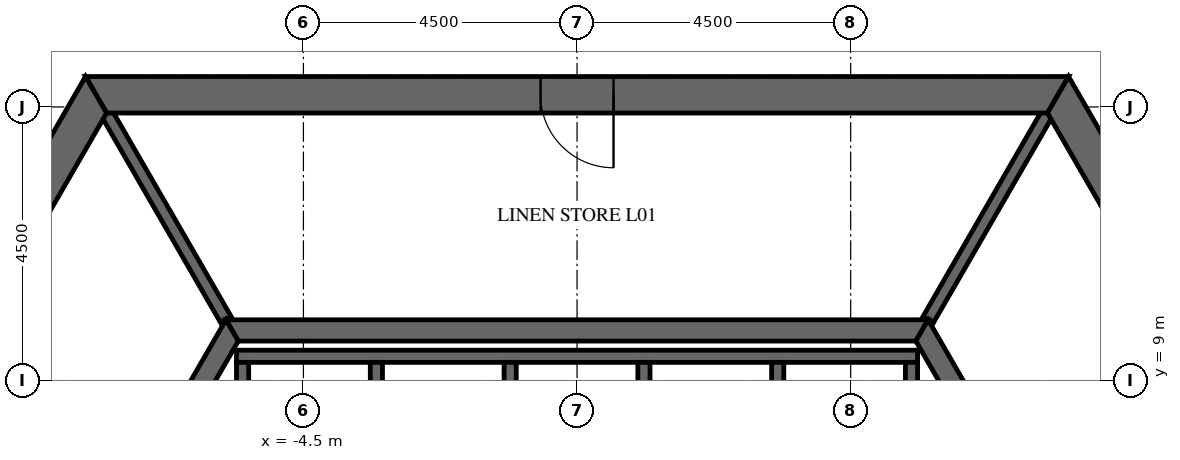
"""IFC4 building model, lengths in metres.
Left out: names, types, materials, properties, quantities, classifications, styles, units other than length and angle.
Written with IfcOpenShell. Run it as: python <this file> out.ifc"""

import sys

from ifc_helpers import new_model, si_unit, direction, frame, frame_2d, origin, place, context, subcontext, project, spatial, polyline, rectangle, outline, extrude, element, fill, save


model = new_model("IFC4")
c1 = context("Model", 3, precision=1e-05, world=origin(), true_north=direction((0.0, 1.0)))
c2 = subcontext(c1, "Body", "Model", "MODEL_VIEW")
j1 = project(units=[si_unit("LENGTHUNIT", "METRE"), si_unit("PLANEANGLEUNIT", "RADIAN")], contexts=[c1])
p1 = place(None, origin())
s1 = spatial("IfcSite", under=j1, at=p1, CompositionType="ELEMENT")
p2 = place(p1, origin())
s2 = spatial("IfcBuilding", under=s1, at=p2, CompositionType="ELEMENT")
p3 = place(p2, frame((0.0, 0.0, 9.0)))
s3 = spatial("IfcBuildingStorey", under=s2, at=p3, CompositionType="ELEMENT", Elevation=9.0)
p4 = place(p3, frame((-7.91, 13.7, -0.25), z_axis=(0.0, 0.0, 1.0), x_axis=(-0.499999880136, -0.866025472988, 0.0)))
e1 = element("IfcWall", 1, at=p4, inside=s3, PredefinedType="SHEAR", context=c2, shape_type="SweptSolid", body=[
    extrude(outline(polyline([(-0.173, -0.3), (15.993, -0.3), (15.646, 0.3), (0.173, 0.3), (-0.173, -0.3)])), origin(), (0.0, 0.0, 1.0), 6.0),
])
p5 = place(p4, frame((7.039, 0.0, 0.25)))
e2 = element("IfcOpeningElement", 2, at=p5, cuts=e1, PredefinedType="OPENING", context=c2, shape_type="SweptSolid", body=[
    extrude(rectangle(XDim=1.8, YDim=2.4, at=frame_2d((0.9, 1.2))), frame((0.0, 0.31, 0.0), z_axis=(0.0, -1.0, 0.0), x_axis=(1.0, 0.0, 0.0)), (0.0, 0.0, 1.0), 0.62),
])
p6 = place(p3, frame((15.819, 0.0, -0.25), z_axis=(0.0, 0.0, 1.0), x_axis=(-0.499999880136, 0.866025472988, 0.0)))
e3 = element("IfcWall", 3, at=p6, inside=s3, PredefinedType="SHEAR", context=c2, shape_type="SweptSolid", body=[
    extrude(outline(polyline([(-0.173, -0.3), (15.993, -0.3), (15.646, 0.3), (0.173, 0.3), (-0.173, -0.3)])), origin(), (0.0, 0.0, 1.0), 6.0),
])
p7 = place(p6, frame((6.981, 0.0, 0.25)))
e4 = element("IfcOpeningElement", 4, at=p7, cuts=e3, PredefinedType="OPENING", context=c2, shape_type="SweptSolid", body=[
    extrude(rectangle(XDim=1.8, YDim=2.4, at=frame_2d((0.9, 1.2))), frame((0.0, 0.31, 0.0), z_axis=(0.0, -1.0, 0.0), x_axis=(1.0, 0.0, 0.0)), (0.0, 0.0, 1.0), 0.62),
])
p8 = place(p3, frame((7.91, 13.7, -0.25), z_axis=(0.0, 0.0, 1.0), x_axis=(-1.0, 0.0, 0.0)))
e5 = element("IfcWall", 5, at=p8, inside=s3, PredefinedType="SHEAR", context=c2, shape_type="SweptSolid", body=[
    extrude(outline(polyline([(-0.173, -0.3), (15.993, -0.3), (15.646, 0.3), (0.173, 0.3), (-0.173, -0.3)])), origin(), (0.0, 0.0, 1.0), 6.0),
])
p9 = place(p8, frame((7.31, 0.0, 0.25)))
e6 = element("IfcOpeningElement", 6, at=p9, cuts=e5, PredefinedType="OPENING", context=c2, shape_type="SweptSolid", body=[
    extrude(rectangle(XDim=1.2, YDim=2.4, at=frame_2d((0.6, 1.2))), frame((0.0, 0.31, 0.0), z_axis=(0.0, -1.0, 0.0), x_axis=(1.0, 0.0, 0.0)), (0.0, 0.0, 1.0), 0.62),
])
p10 = place(p3, frame((-5.673, 9.825, -0.25), z_axis=(0.0, 0.0, 1.0), x_axis=(-0.499995046907, -0.866028263435, 0.0)))
e7 = element("IfcWall", 7, at=p10, inside=s3, PredefinedType="SHEAR", context=c2, shape_type="SweptSolid", body=[
    extrude(outline(polyline([(-0.101, -0.175), (11.446, -0.175), (11.244, 0.175), (0.101, 0.175), (-0.101, -0.175)])), origin(), (0.0, 0.0, 1.0), 6.0),
])
p11 = place(p10, frame((4.801, 0.0, 0.25)))
e8 = element("IfcOpeningElement", 8, at=p11, cuts=e7, PredefinedType="OPENING", context=c2, shape_type="SweptSolid", body=[
    extrude(rectangle(XDim=1.8, YDim=2.4, at=frame_2d((0.9, 1.2))), frame((0.0, 0.185, 0.0), z_axis=(0.0, -1.0, 0.0), x_axis=(1.0, 0.0, 0.0)), (0.0, 0.0, 1.0), 0.37),
])
p12 = place(p3, frame((11.345, 0.0, -0.25), z_axis=(0.0, 0.0, 1.0), x_axis=(-0.499995046907, 0.866028263435, 0.0)))
e9 = element("IfcWall", 9, at=p12, inside=s3, PredefinedType="SHEAR", context=c2, shape_type="SweptSolid", body=[
    extrude(outline(polyline([(-0.101, -0.175), (11.446, -0.175), (11.244, 0.175), (0.101, 0.175), (-0.101, -0.175)])), origin(), (0.0, 0.0, 1.0), 6.0),
])
p13 = place(p12, frame((4.744, 0.0, 0.25)))
e10 = element("IfcOpeningElement", 10, at=p13, cuts=e9, PredefinedType="OPENING", context=c2, shape_type="SweptSolid", body=[
    extrude(rectangle(XDim=1.8, YDim=2.4, at=frame_2d((0.9, 1.2))), frame((0.0, 0.185, 0.0), z_axis=(0.0, -1.0, 0.0), x_axis=(1.0, 0.0, 0.0)), (0.0, 0.0, 1.0), 0.37),
])
p14 = place(p3, frame((5.673, 9.825, -0.25), z_axis=(0.0, 0.0, 1.0), x_axis=(-1.0, 0.0, 0.0)))
e11 = element("IfcWall", 11, at=p14, inside=s3, PredefinedType="SHEAR", context=c2, shape_type="SweptSolid", body=[
    extrude(outline(polyline([(-0.101, -0.175), (11.446, -0.175), (11.244, 0.175), (0.101, 0.175), (-0.101, -0.175)])), origin(), (0.0, 0.0, 1.0), 6.0),
])
p15 = place(p3, frame((-5.6, 9.4, -0.25), z_axis=(0.0, 0.0, 1.0), x_axis=(1.0, 0.0, 0.0)))
e12 = element("IfcWall", 12, at=p15, inside=s3, PredefinedType="SHEAR", context=c2, shape_type="SweptSolid", body=[
    extrude(rectangle(XDim=11.2, YDim=0.2, at=frame_2d((5.6, 0.0))), origin(), (0.0, 0.0, 1.0), 6.0),
])
for number, where, z_axis, x_axis in (
    (13, (-5.5, 6.4, -0.25), (0.0, 0.0, 1.0), (0.0, 1.0, 0.0)),
    (14, (-3.3, 6.4, -0.25), (0.0, 0.0, 1.0), (0.0, 1.0, 0.0)),
    (15, (-1.1, 6.4, -0.25), (0.0, 0.0, 1.0), (0.0, 1.0, 0.0)),
    (16, (1.1, 6.4, -0.25), (0.0, 0.0, 1.0), (0.0, 1.0, 0.0)),
    (17, (3.3, 6.4, -0.25), (0.0, 0.0, 1.0), (0.0, 1.0, 0.0)),
    (18, (5.5, 6.4, -0.25), (0.0, 0.0, 1.0), (0.0, 1.0, 0.0)),
):
    element("IfcWall", number, at=place(p3, frame(where, z_axis=z_axis, x_axis=x_axis)), inside=s3, PredefinedType="SHEAR", context=c2, shape_type="SweptSolid", body=[
        extrude(rectangle(XDim=2.9, YDim=0.2, at=frame_2d((1.45, 0.0))), origin(), (0.0, 0.0, 1.0), 6.0),
    ])
for number, where, z_axis, x_axis in (
    (19, (5.773, 10.0, -0.25), (0.0, 0.0, 1.0), (0.5, 0.866, 0.0)),
    (20, (-5.773, 10.0, -0.25), (0.0, 0.0, 1.0), (-0.5, 0.866, 0.0)),
):
    element("IfcWall", number, at=place(p3, frame(where, z_axis=z_axis, x_axis=x_axis)), inside=s3, PredefinedType="SHEAR", context=c2, shape_type="SweptSolid", body=[
        extrude(rectangle(XDim=3.926, YDim=0.2, at=frame_2d((1.963, 0.0))), origin(), (0.0, 0.0, 1.0), 6.0),
    ])
p16 = place(p9, origin())
e21 = element("IfcDoor", 21, at=p16, inside=s3, OperationType="SINGLE_SWING_LEFT", PredefinedType="DOOR", context=c2, shape_type="SweptSolid", body=[
    extrude(rectangle(XDim=1.2, YDim=2.4, at=frame_2d((0.6, 1.2))), frame((0.0, 0.025, 0.0), z_axis=(0.0, -1.0, 0.0), x_axis=(1.0, 0.0, 0.0)), (0.0, 0.0, 1.0), 0.05),
])
fill(e6, e21)
save(model, sys.argv[1])
